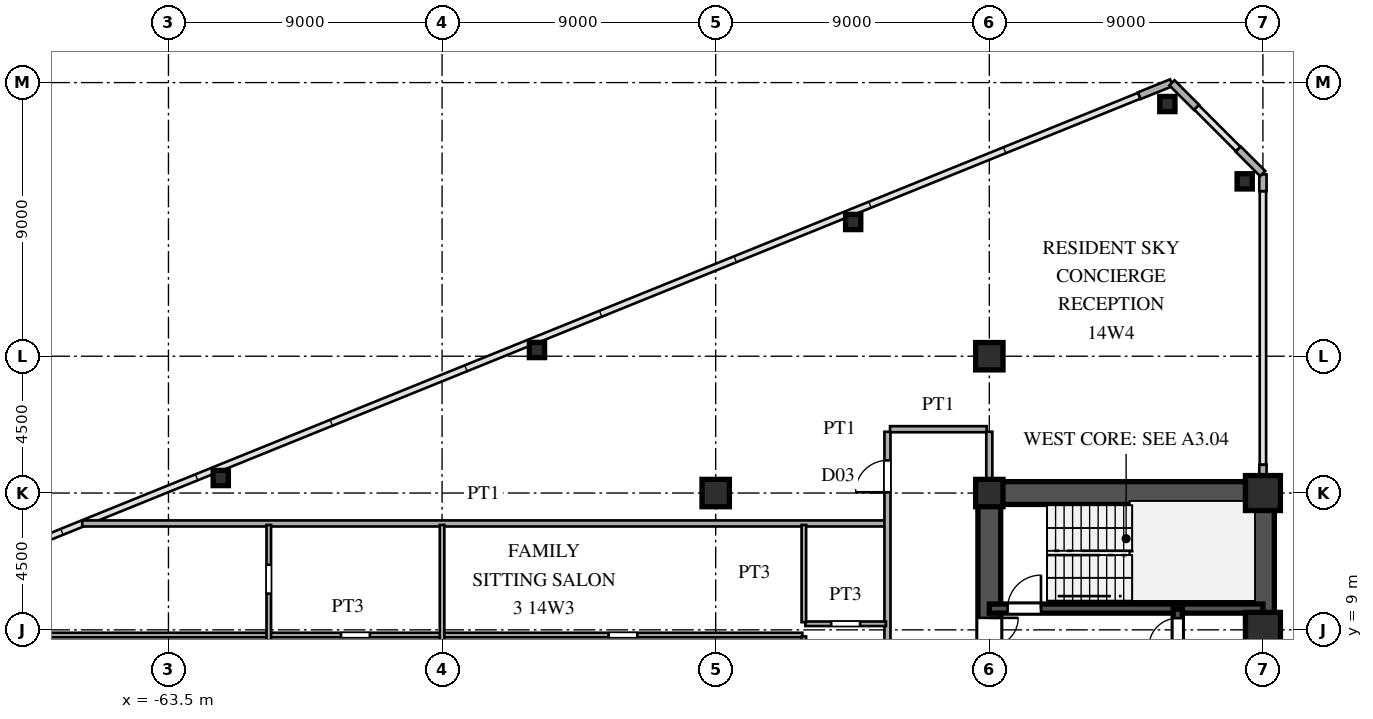
"""IFC4 building model, lengths in metres.
Left out: names, types, materials, properties, quantities, classifications, styles, units other than length and angle.
Written with IfcOpenShell. Run it as: python <this file> out.ifc"""

import sys

from ifc_helpers import new_model, si_unit, direction, frame, frame_2d, origin, origin_2d, place, context, subcontext, project, spatial, rectangle, hollow_rectangle, i_section, extrude, source, transform, mapped, element, fill, save


model = new_model("IFC4")
c1 = context("Model", 3, precision=1e-05, world=origin(), true_north=direction((0.0, 1.0)))
c2 = subcontext(c1, "Body", "Model", "MODEL_VIEW")
j1 = project(units=[si_unit("LENGTHUNIT", "METRE"), si_unit("PLANEANGLEUNIT", "RADIAN")], contexts=[c1])
p1 = place(None, origin())
s1 = spatial("IfcSite", under=j1, at=p1, CompositionType="ELEMENT")
p2 = place(p1, origin())
s2 = spatial("IfcBuilding", under=s1, at=p2, CompositionType="ELEMENT")
p3 = place(p2, frame((0.0, 0.0, 54.9)))
s3 = spatial("IfcBuildingStorey", under=s2, at=p3, CompositionType="ELEMENT", Elevation=54.9)
m1 = source(origin(), c2, "Body", "SweptSolid", [
    extrude(hollow_rectangle(XDim=1.15, YDim=1.15, WallThickness=0.048, at=origin_2d()), origin(), (0.0, 0.0, 1.0), 3.6),
])
for number, where, z_axis, x_axis in (
    (1, (-27.5, 9.0, 0.0), (0.0, 0.0, 1.0), (1.0, 0.0, 0.0)),
    (2, (-27.5, 13.5, 0.0), (0.0, 0.0, 1.0), (1.0, 0.0, 0.0)),
):
    element("IfcColumn", number, at=place(p3, frame(where, z_axis=z_axis, x_axis=x_axis)), inside=s3, PredefinedType="COLUMN", context=c2, shape_type="MappedRepresentation", body=[
        mapped(m1, transform((0.0, 0.0, 0.0), scale=1.0)),
    ])
m2 = source(origin(), c2, "Body", "SweptSolid", [
    extrude(i_section(OverallWidth=0.9, OverallDepth=0.9, WebThickness=0.036, FlangeThickness=0.055, at=origin_2d()), origin(), (0.0, 0.0, 1.0), 3.6),
])
for number, where, z_axis, x_axis in (
    (3, (-36.5, 13.5, 0.0), (0.0, 0.0, 1.0), (1.0, 0.0, 0.0)),
    (4, (-36.5, 18.0, 0.0), (0.0, 0.0, 1.0), (1.0, 0.0, 0.0)),
    (5, (-45.5, 13.5, 0.0), (0.0, 0.0, 1.0), (1.0, 0.0, 0.0)),
):
    element("IfcColumn", number, at=place(p3, frame(where, z_axis=z_axis, x_axis=x_axis)), inside=s3, PredefinedType="COLUMN", context=c2, shape_type="MappedRepresentation", body=[
        mapped(m2, transform((0.0, 0.0, 0.0), scale=1.0)),
    ])
m3 = source(origin(), c2, "Body", "SweptSolid", [
    extrude(hollow_rectangle(XDim=0.5, YDim=0.5, WallThickness=0.02, at=origin_2d()), origin(), (0.0, 0.0, 1.0), 3.6),
])
for number, where, z_axis, x_axis in (
    (6, (-28.1, 23.751, 0.0), (0.0, 0.0, 1.0), (1.0, 0.0, 0.0)),
    (7, (-30.643, 26.295, 0.0), (0.0, 0.0, 1.0), (1.0, 0.0, 0.0)),
    (8, (-40.977, 22.414, 0.0), (0.0, 0.0, 1.0), (1.0, 0.0, 0.0)),
    (9, (-51.378, 18.204, 0.0), (0.0, 0.0, 1.0), (1.0, 0.0, 0.0)),
    (10, (-61.779, 13.994, 0.0), (0.0, 0.0, 1.0), (1.0, 0.0, 0.0)),
):
    element("IfcColumn", number, at=place(p3, frame(where, z_axis=z_axis, x_axis=x_axis)), inside=s3, PredefinedType="COLUMN", context=c2, shape_type="MappedRepresentation", body=[
        mapped(m3, transform((0.0, 0.0, 0.0), scale=1.0)),
    ])
p4 = place(p3, frame((-27.5, 13.88, 0.0), z_axis=(0.0, 0.0, 1.0), x_axis=(0.0, 1.0, 0.0)))
e11 = element("IfcWall", 11, at=p4, inside=s3, PredefinedType="SOLIDWALL", context=c2, shape_type="SweptSolid", body=[
    extrude(rectangle(XDim=0.55, YDim=0.24, at=frame_2d((0.275, 0.0))), origin(), (0.0, 0.0, 1.0), 2.88),
])
p5 = place(p3, frame((-27.5, 23.43, 0.0), z_axis=(0.0, 0.0, 1.0), x_axis=(0.0, 1.0, 0.0)))
e12 = element("IfcWall", 12, at=p5, inside=s3, PredefinedType="SOLIDWALL", context=c2, shape_type="SweptSolid", body=[
    extrude(rectangle(XDim=0.55, YDim=0.24, at=frame_2d((0.275, 0.0))), origin(), (0.0, 0.0, 1.0), 3.38),
])
for number, where, z_axis, x_axis in (
    (13, (-27.507, 24.007, 0.0), (0.0, 0.0, 1.0), (-0.707, 0.707, 0.0)),
    (14, (-29.687, 26.187, 0.0), (0.0, 0.0, 1.0), (-0.707, 0.707, 0.0)),
):
    element("IfcWall", number, at=place(p3, frame(where, z_axis=z_axis, x_axis=x_axis)), inside=s3, PredefinedType="SOLIDWALL", context=c2, shape_type="SweptSolid", body=[
        extrude(rectangle(XDim=1.14, YDim=0.24, at=frame_2d((0.57, 0.0))), origin(), (0.0, 0.0, 1.0), 3.38),
    ])
p6 = place(p3, frame((-30.509, 26.996, 0.0), z_axis=(0.0, 0.0, 1.0), x_axis=(-0.927007103665, -0.375043770452, 0.0)))
e15 = element("IfcWall", 15, at=p6, inside=s3, PredefinedType="SOLIDWALL", context=c2, shape_type="SweptSolid", body=[
    extrude(rectangle(XDim=1.14, YDim=0.24, at=frame_2d((0.57, 0.0))), origin(), (0.0, 0.0, 1.0), 3.38),
])
p7 = place(p3, frame((-27.5, 1.3, 0.0), z_axis=(0.0, 0.0, 1.0), x_axis=(0.0, 1.0, 0.0)))
e16 = element("IfcWall", 16, at=p7, inside=s3, PredefinedType="SHEAR", context=c2, shape_type="SweptSolid", body=[
    extrude(rectangle(XDim=12.2, YDim=0.75, at=frame_2d((6.1, 0.0))), origin(), (0.0, 0.0, 1.0), 3.38),
])
p8 = place(p3, frame((-36.5, 13.5, 0.0), z_axis=(0.0, 0.0, 1.0), x_axis=(1.0, 0.0, 0.0)))
e17 = element("IfcWall", 17, at=p8, inside=s3, PredefinedType="SHEAR", context=c2, shape_type="SweptSolid", body=[
    extrude(rectangle(XDim=9.0, YDim=0.75, at=frame_2d((4.5, 0.0))), origin(), (0.0, 0.0, 1.0), 3.38),
])
p9 = place(p3, frame((-36.5, 8.2, 0.0), z_axis=(0.0, 0.0, 1.0), x_axis=(0.0, 1.0, 0.0)))
e18 = element("IfcWall", 18, at=p9, inside=s3, PredefinedType="SHEAR", context=c2, shape_type="SweptSolid", body=[
    extrude(rectangle(XDim=5.45, YDim=0.75, at=frame_2d((2.725, 0.0))), origin(), (0.0, 0.0, 1.0), 3.38),
])
p10 = place(p9, frame((0.245, 0.0, 0.0)))
e19 = element("IfcOpeningElement", 19, at=p10, cuts=e18, PredefinedType="OPENING", context=c2, shape_type="SweptSolid", body=[
    extrude(rectangle(XDim=0.95, YDim=2.15, at=frame_2d((0.475, 1.075))), frame((0.0, 0.385, 0.0), z_axis=(0.0, -1.0, 0.0), x_axis=(1.0, 0.0, 0.0)), (0.0, 0.0, 1.0), 0.77),
])
p11 = place(p3, frame((-36.5, 9.7, 0.0), z_axis=(0.0, 0.0, 1.0), x_axis=(1.0, 0.0, 0.0)))
e20 = element("IfcWall", 20, at=p11, inside=s3, PredefinedType="SHEAR", context=c2, shape_type="SweptSolid", body=[
    extrude(rectangle(XDim=9.0, YDim=0.3, at=frame_2d((4.5, 0.0))), origin(), (0.0, 0.0, 1.0), 3.38),
])
p12 = place(p11, frame((0.6, 0.0, 0.0)))
e21 = element("IfcOpeningElement", 21, at=p12, cuts=e20, PredefinedType="OPENING", context=c2, shape_type="SweptSolid", body=[
    extrude(rectangle(XDim=1.1, YDim=2.2, at=frame_2d((0.55, 1.1))), frame((0.0, 0.16, 0.0), z_axis=(0.0, -1.0, 0.0), x_axis=(1.0, 0.0, 0.0)), (0.0, 0.0, 1.0), 0.32),
])
p13 = place(p3, frame((-30.3, 8.15, 0.0), z_axis=(0.0, 0.0, 1.0), x_axis=(0.0, 1.0, 0.0)))
e22 = element("IfcWall", 22, at=p13, inside=s3, PredefinedType="SHEAR", context=c2, shape_type="SweptSolid", body=[
    extrude(rectangle(XDim=1.53, YDim=0.3, at=frame_2d((0.765, 0.0))), origin(), (0.0, 0.0, 1.0), 3.38),
])
p14 = place(p13, frame((0.285, 0.0, 0.0)))
e23 = element("IfcOpeningElement", 23, at=p14, cuts=e22, PredefinedType="OPENING", context=c2, shape_type="SweptSolid", body=[
    extrude(rectangle(XDim=0.95, YDim=2.15, at=frame_2d((0.475, 1.075))), frame((0.0, 0.16, 0.0), z_axis=(0.0, -1.0, 0.0), x_axis=(1.0, 0.0, 0.0)), (0.0, 0.0, 1.0), 0.32),
])
p15 = place(p3, frame((-72.535, 8.83, 0.0), z_axis=(0.0, 0.0, 1.0), x_axis=(1.0, 0.0, 0.0)))
e24 = element("IfcWall", 24, at=p15, inside=s3, PredefinedType="PARTITIONING", context=c2, shape_type="SweptSolid", body=[
    extrude(rectangle(XDim=29.885, YDim=0.15, at=frame_2d((14.942, 0.0))), origin(), (0.0, 0.0, 1.0), 3.38),
])
p16 = place(p15, frame((23.51, 0.0, 0.0)))
e25 = element("IfcOpeningElement", 25, at=p16, cuts=e24, PredefinedType="OPENING", context=c2, shape_type="SweptSolid", body=[
    extrude(rectangle(XDim=0.95, YDim=2.15, at=frame_2d((0.475, 1.075))), frame((0.0, 0.085, 0.0), z_axis=(0.0, -1.0, 0.0), x_axis=(1.0, 0.0, 0.0)), (0.0, 0.0, 1.0), 0.17),
])
p17 = place(p15, frame((14.71, 0.0, 0.0)))
e26 = element("IfcOpeningElement", 26, at=p17, cuts=e24, PredefinedType="OPENING", context=c2, shape_type="SweptSolid", body=[
    extrude(rectangle(XDim=0.95, YDim=2.15, at=frame_2d((0.475, 1.075))), frame((0.0, 0.085, 0.0), z_axis=(0.0, -1.0, 0.0), x_axis=(1.0, 0.0, 0.0)), (0.0, 0.0, 1.0), 0.17),
])
p18 = place(p3, frame((-42.55, 9.2, 0.0), z_axis=(0.0, 0.0, 1.0), x_axis=(1.0, 0.0, 0.0)))
e27 = element("IfcWall", 27, at=p18, inside=s3, PredefinedType="PARTITIONING", context=c2, shape_type="SweptSolid", body=[
    extrude(rectangle(XDim=2.65, YDim=0.15, at=frame_2d((1.325, 0.0))), origin(), (0.0, 0.0, 1.0), 3.38),
])
p19 = place(p18, frame((0.85, 0.0, 0.0)))
e28 = element("IfcOpeningElement", 28, at=p19, cuts=e27, PredefinedType="OPENING", context=c2, shape_type="SweptSolid", body=[
    extrude(rectangle(XDim=0.95, YDim=2.15, at=frame_2d((0.475, 1.075))), frame((0.0, 0.085, 0.0), z_axis=(0.0, -1.0, 0.0), x_axis=(1.0, 0.0, 0.0)), (0.0, 0.0, 1.0), 0.17),
])
p20 = place(p3, frame((-66.337, 12.5, 0.0), z_axis=(0.0, 0.0, 1.0), x_axis=(1.0, 0.0, 0.0)))
e29 = element("IfcWall", 29, at=p20, inside=s3, PredefinedType="PARTITIONING", context=c2, shape_type="SweptSolid", body=[
    extrude(rectangle(XDim=26.407, YDim=0.2, at=frame_2d((13.204, 0.0))), origin(), (0.0, 0.0, 1.0), 3.38),
])
p21 = place(p3, frame((-39.765, 15.6, 0.0), z_axis=(0.0, 0.0, 1.0), x_axis=(1.0, 0.0, 0.0)))
e30 = element("IfcWall", 30, at=p21, inside=s3, PredefinedType="PARTITIONING", context=c2, shape_type="SweptSolid", body=[
    extrude(rectangle(XDim=3.18, YDim=0.2, at=frame_2d((1.59, 0.0))), origin(), (0.0, 0.0, 1.0), 3.38),
])
p22 = place(p3, frame((-60.2, -12.45, 0.0), z_axis=(0.0, 0.0, 1.0), x_axis=(0.0, 1.0, 0.0)))
e31 = element("IfcWall", 31, at=p22, inside=s3, PredefinedType="PARTITIONING", context=c2, shape_type="SweptSolid", body=[
    extrude(rectangle(XDim=24.9, YDim=0.15, at=frame_2d((12.45, 0.0))), origin(), (0.0, 0.0, 1.0), 3.38),
])
p23 = place(p22, frame((1.808, 0.0, 0.0)))
e32 = element("IfcOpeningElement", 32, at=p23, cuts=e31, PredefinedType="OPENING", context=c2, shape_type="SweptSolid", body=[
    extrude(rectangle(XDim=0.95, YDim=2.15, at=frame_2d((0.475, 1.075))), frame((0.0, 0.085, 0.0), z_axis=(0.0, -1.0, 0.0), x_axis=(1.0, 0.0, 0.0)), (0.0, 0.0, 1.0), 0.17),
])
p24 = place(p22, frame((6.475, 0.0, 0.0)))
e33 = element("IfcOpeningElement", 33, at=p24, cuts=e31, PredefinedType="OPENING", context=c2, shape_type="SweptSolid", body=[
    extrude(rectangle(XDim=0.95, YDim=2.15, at=frame_2d((0.475, 1.075))), frame((0.0, 0.085, 0.0), z_axis=(0.0, -1.0, 0.0), x_axis=(1.0, 0.0, 0.0)), (0.0, 0.0, 1.0), 0.17),
])
p25 = place(p22, frame((11.142, 0.0, 0.0)))
e34 = element("IfcOpeningElement", 34, at=p25, cuts=e31, PredefinedType="OPENING", context=c2, shape_type="SweptSolid", body=[
    extrude(rectangle(XDim=0.95, YDim=2.15, at=frame_2d((0.475, 1.075))), frame((0.0, 0.085, 0.0), z_axis=(0.0, -1.0, 0.0), x_axis=(1.0, 0.0, 0.0)), (0.0, 0.0, 1.0), 0.17),
])
p26 = place(p22, frame((15.308, 0.0, 0.0)))
e35 = element("IfcOpeningElement", 35, at=p26, cuts=e31, PredefinedType="OPENING", context=c2, shape_type="SweptSolid", body=[
    extrude(rectangle(XDim=0.95, YDim=2.15, at=frame_2d((0.475, 1.075))), frame((0.0, 0.085, 0.0), z_axis=(0.0, -1.0, 0.0), x_axis=(1.0, 0.0, 0.0)), (0.0, 0.0, 1.0), 0.17),
])
p27 = place(p22, frame((18.975, 0.0, 0.0)))
e36 = element("IfcOpeningElement", 36, at=p27, cuts=e31, PredefinedType="OPENING", context=c2, shape_type="SweptSolid", body=[
    extrude(rectangle(XDim=0.95, YDim=2.15, at=frame_2d((0.475, 1.075))), frame((0.0, 0.085, 0.0), z_axis=(0.0, -1.0, 0.0), x_axis=(1.0, 0.0, 0.0)), (0.0, 0.0, 1.0), 0.17),
])
p28 = place(p22, frame((22.642, 0.0, 0.0)))
e37 = element("IfcOpeningElement", 37, at=p28, cuts=e31, PredefinedType="OPENING", context=c2, shape_type="SweptSolid", body=[
    extrude(rectangle(XDim=0.95, YDim=2.15, at=frame_2d((0.475, 1.075))), frame((0.0, 0.085, 0.0), z_axis=(0.0, -1.0, 0.0), x_axis=(1.0, 0.0, 0.0)), (0.0, 0.0, 1.0), 0.17),
])
p29 = place(p3, frame((-54.5, -12.45, 0.0), z_axis=(0.0, 0.0, 1.0), x_axis=(0.0, 1.0, 0.0)))
e38 = element("IfcWall", 38, at=p29, inside=s3, PredefinedType="PARTITIONING", context=c2, shape_type="SweptSolid", body=[
    extrude(rectangle(XDim=24.9, YDim=0.15, at=frame_2d((12.45, 0.0))), origin(), (0.0, 0.0, 1.0), 2.68),
])
p30 = place(p29, frame((6.475, 0.0, 0.0)))
e39 = element("IfcOpeningElement", 39, at=p30, cuts=e38, PredefinedType="OPENING", context=c2, shape_type="SweptSolid", body=[
    extrude(rectangle(XDim=0.95, YDim=2.15, at=frame_2d((0.475, 1.075))), frame((0.0, 0.085, 0.0), z_axis=(0.0, -1.0, 0.0), x_axis=(1.0, 0.0, 0.0)), (0.0, 0.0, 1.0), 0.17),
])
p31 = place(p29, frame((18.975, 0.0, 0.0)))
e40 = element("IfcOpeningElement", 40, at=p31, cuts=e38, PredefinedType="OPENING", context=c2, shape_type="SweptSolid", body=[
    extrude(rectangle(XDim=0.95, YDim=2.15, at=frame_2d((0.475, 1.075))), frame((0.0, 0.085, 0.0), z_axis=(0.0, -1.0, 0.0), x_axis=(1.0, 0.0, 0.0)), (0.0, 0.0, 1.0), 0.17),
])
p32 = place(p3, frame((-42.6, 5.217, 0.0), z_axis=(0.0, 0.0, 1.0), x_axis=(0.0, 1.0, 0.0)))
e41 = element("IfcWall", 41, at=p32, inside=s3, PredefinedType="PARTITIONING", context=c2, shape_type="SweptSolid", body=[
    extrude(rectangle(XDim=3.566, YDim=0.15, at=frame_2d((1.783, 0.0))), origin(), (0.0, 0.0, 1.0), 3.38),
])
p33 = place(p32, frame((1.308, 0.0, 0.0)))
e42 = element("IfcOpeningElement", 42, at=p33, cuts=e41, PredefinedType="OPENING", context=c2, shape_type="SweptSolid", body=[
    extrude(rectangle(XDim=0.95, YDim=2.15, at=frame_2d((0.475, 1.075))), frame((0.0, 0.085, 0.0), z_axis=(0.0, -1.0, 0.0), x_axis=(1.0, 0.0, 0.0)), (0.0, 0.0, 1.0), 0.17),
])
p34 = place(p3, frame((-42.6, 9.252, 0.0), z_axis=(0.0, 0.0, 1.0), x_axis=(0.0, 1.0, 0.0)))
e43 = element("IfcWall", 43, at=p34, inside=s3, PredefinedType="PARTITIONING", context=c2, shape_type="SweptSolid", body=[
    extrude(rectangle(XDim=3.198, YDim=0.15, at=frame_2d((1.599, 0.0))), origin(), (0.0, 0.0, 1.0), 3.38),
])
p35 = place(p3, frame((-39.85, -15.515, 0.0), z_axis=(0.0, 0.0, 1.0), x_axis=(0.0, 1.0, 0.0)))
e44 = element("IfcWall", 44, at=p35, inside=s3, PredefinedType="PARTITIONING", context=c2, shape_type="SweptSolid", body=[
    extrude(rectangle(XDim=31.03, YDim=0.2, at=frame_2d((15.515, 0.0))), origin(), (0.0, 0.0, 1.0), 3.38),
])
p36 = place(p35, frame((0.94, 0.0, 0.0)))
e45 = element("IfcOpeningElement", 45, at=p36, cuts=e44, PredefinedType="OPENING", context=c2, shape_type="SweptSolid", body=[
    extrude(rectangle(XDim=1.05, YDim=2.25, at=frame_2d((0.525, 1.125))), frame((0.0, 0.11, 0.0), z_axis=(0.0, -1.0, 0.0), x_axis=(1.0, 0.0, 0.0)), (0.0, 0.0, 1.0), 0.22),
])
p37 = place(p35, frame((9.28, 0.0, 0.0)))
e46 = element("IfcOpeningElement", 46, at=p37, cuts=e44, PredefinedType="OPENING", context=c2, shape_type="SweptSolid", body=[
    extrude(rectangle(XDim=1.05, YDim=2.25, at=frame_2d((0.525, 1.125))), frame((0.0, 0.11, 0.0), z_axis=(0.0, -1.0, 0.0), x_axis=(1.0, 0.0, 0.0)), (0.0, 0.0, 1.0), 0.22),
])
p38 = place(p35, frame((21.825, 0.0, 0.0)))
e47 = element("IfcOpeningElement", 47, at=p38, cuts=e44, PredefinedType="OPENING", context=c2, shape_type="SweptSolid", body=[
    extrude(rectangle(XDim=1.05, YDim=2.25, at=frame_2d((0.525, 1.125))), frame((0.0, 0.11, 0.0), z_axis=(0.0, -1.0, 0.0), x_axis=(1.0, 0.0, 0.0)), (0.0, 0.0, 1.0), 0.22),
])
p39 = place(p35, frame((29.04, 0.0, 0.0)))
e48 = element("IfcOpeningElement", 48, at=p39, cuts=e44, PredefinedType="OPENING", context=c2, shape_type="SweptSolid", body=[
    extrude(rectangle(XDim=1.05, YDim=2.25, at=frame_2d((0.525, 1.125))), frame((0.0, 0.11, 0.0), z_axis=(0.0, -1.0, 0.0), x_axis=(1.0, 0.0, 0.0)), (0.0, 0.0, 1.0), 0.22),
])
p40 = place(p3, frame((-36.5, 13.88, 0.0), z_axis=(0.0, 0.0, 1.0), x_axis=(0.0, 1.0, 0.0)))
e49 = element("IfcWall", 49, at=p40, inside=s3, PredefinedType="PARTITIONING", context=c2, shape_type="SweptSolid", body=[
    extrude(rectangle(XDim=1.635, YDim=0.2, at=frame_2d((0.817, 0.0))), origin(), (0.0, 0.0, 1.0), 2.68),
])
m4 = source(origin(), c2, "Body", "SweptSolid", [
    extrude(rectangle(XDim=0.95, YDim=2.15, at=frame_2d((0.475, 1.075))), frame((0.0, 0.025, 0.0), z_axis=(0.0, -1.0, 0.0), x_axis=(1.0, 0.0, 0.0)), (0.0, 0.0, 1.0), 0.05),
])
p41 = place(p10, frame((0.95, 0.0, 0.0), z_axis=(0.0, 0.0, 1.0), x_axis=(-1.0, 0.0, 0.0)))
e50 = element("IfcDoor", 50, at=p41, inside=s3, OperationType="SINGLE_SWING_RIGHT", PredefinedType="DOOR", context=c2, shape_type="MappedRepresentation", body=[
    mapped(m4, transform((0.0, 0.0, 0.0), scale=1.0)),
])
fill(e19, e50)
m5 = source(origin(), c2, "Body", "SweptSolid", [
    extrude(rectangle(XDim=1.1, YDim=2.2, at=frame_2d((0.55, 1.1))), frame((0.0, 0.025, 0.0), z_axis=(0.0, -1.0, 0.0), x_axis=(1.0, 0.0, 0.0)), (0.0, 0.0, 1.0), 0.05),
])
p42 = place(p12, origin())
e51 = element("IfcDoor", 51, at=p42, inside=s3, OperationType="SINGLE_SWING_RIGHT", PredefinedType="DOOR", context=c2, shape_type="MappedRepresentation", body=[
    mapped(m5, transform((0.0, 0.0, 0.0), scale=1.0)),
])
fill(e21, e51)
p43 = place(p14, origin())
e52 = element("IfcDoor", 52, at=p43, inside=s3, OperationType="SINGLE_SWING_LEFT", PredefinedType="DOOR", context=c2, shape_type="MappedRepresentation", body=[
    mapped(m4, transform((0.0, 0.0, 0.0), scale=1.0)),
])
fill(e23, e52)
m6 = source(origin(), c2, "Body", "SweptSolid", [
    extrude(rectangle(XDim=1.05, YDim=2.25, at=frame_2d((0.525, 1.125))), frame((0.0, 0.025, 0.0), z_axis=(0.0, -1.0, 0.0), x_axis=(1.0, 0.0, 0.0)), (0.0, 0.0, 1.0), 0.05),
])
p44 = place(p39, origin())
e53 = element("IfcDoor", 53, at=p44, inside=s3, OperationType="SINGLE_SWING_LEFT", PredefinedType="DOOR", context=c2, shape_type="MappedRepresentation", body=[
    mapped(m6, transform((0.0, 0.0, 0.0), scale=1.0)),
])
fill(e48, e53)
save(model, sys.argv[1])
